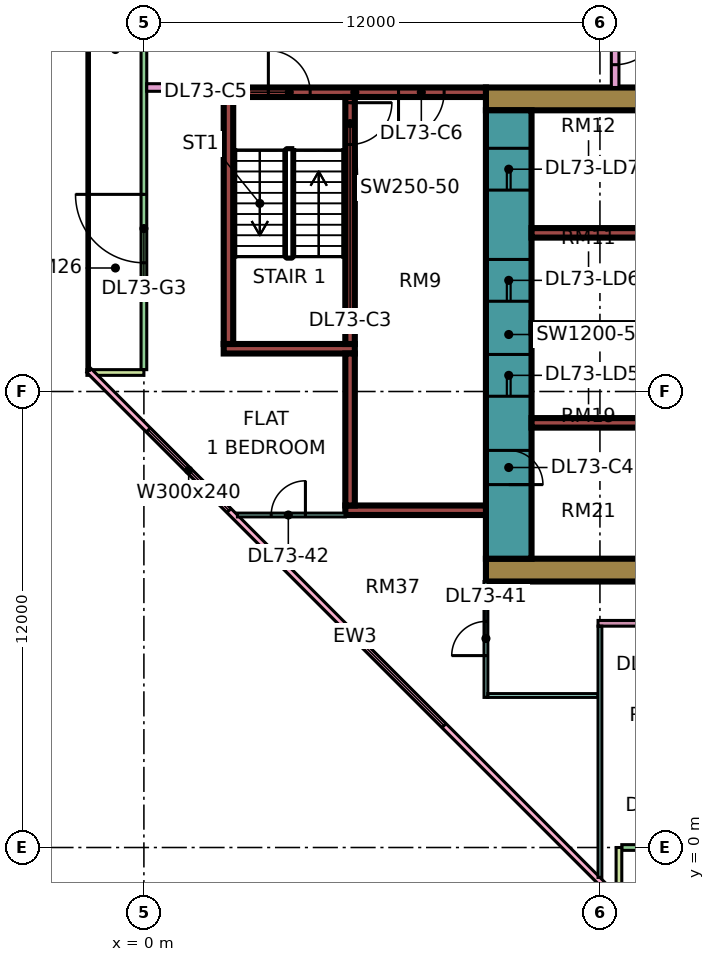
"""IFC4 building model, lengths in metres.
Left out: names, types, materials, properties, quantities, classifications, styles, units other than length and angle.
Written with IfcOpenShell. Run it as: python <this file> out.ifc"""

import sys

from ifc_helpers import new_model, si_unit, direction, frame, frame_2d, origin, place, context, subcontext, project, spatial, rectangle, extrude, element, fill, save


model = new_model("IFC4")
c1 = context("Model", 3, precision=1e-05, world=origin(), true_north=direction((0.0, 1.0)))
c2 = subcontext(c1, "Body", "Model", "MODEL_VIEW")
j1 = project(units=[si_unit("LENGTHUNIT", "METRE"), si_unit("PLANEANGLEUNIT", "RADIAN")], contexts=[c1])
p1 = place(None, origin())
s1 = spatial("IfcSite", under=j1, at=p1, CompositionType="ELEMENT")
p2 = place(p1, origin())
s2 = spatial("IfcBuilding", under=s1, at=p2, CompositionType="ELEMENT")
p3 = place(p2, frame((0.0, 0.0, 310.9)))
s3 = spatial("IfcBuildingStorey", under=s2, at=p3, CompositionType="ELEMENT", Elevation=310.9)
p4 = place(p3, frame((9.0, 7.3, 0.0), z_axis=(0.0, 0.0, 1.0), x_axis=(1.0, 0.0, 0.0)))
e1 = element("IfcWall", 1, at=p4, inside=s3, PredefinedType="SHEAR", context=c2, shape_type="SweptSolid", body=[
    extrude(rectangle(XDim=25.0, YDim=0.6, at=frame_2d((12.5, 0.0))), origin(), (0.0, 0.0, 1.0), 3.75),
])
p5 = place(p3, frame((9.0, 19.7, 0.0), z_axis=(0.0, 0.0, 1.0), x_axis=(1.0, 0.0, 0.0)))
e2 = element("IfcWall", 2, at=p5, inside=s3, PredefinedType="SHEAR", context=c2, shape_type="SweptSolid", body=[
    extrude(rectangle(XDim=25.0, YDim=0.6, at=frame_2d((12.5, 0.0))), origin(), (0.0, 0.0, 1.0), 3.75),
])
p6 = place(p5, frame((19.1, 0.0, 0.0)))
e3 = element("IfcOpeningElement", 3, at=p6, cuts=e2, PredefinedType="OPENING", context=c2, shape_type="SweptSolid", body=[
    extrude(rectangle(XDim=1.8, YDim=2.4, at=frame_2d((0.9, 1.2))), frame((0.0, 0.31, 0.0), z_axis=(0.0, -1.0, 0.0), x_axis=(1.0, 0.0, 0.0)), (0.0, 0.0, 1.0), 0.62),
])
p7 = place(p3, frame((9.6, 7.6, 0.0), z_axis=(0.0, 0.0, 1.0), x_axis=(0.0, 1.0, 0.0)))
e4 = element("IfcWall", 4, at=p7, inside=s3, PredefinedType="SHEAR", context=c2, shape_type="SweptSolid", body=[
    extrude(rectangle(XDim=11.8, YDim=1.2, at=frame_2d((5.9, 0.0))), origin(), (0.0, 0.0, 1.0), 3.75),
])
p8 = place(p7, frame((4.275, 0.0, 0.0)))
e5 = element("IfcOpeningElement", 5, at=p8, cuts=e4, PredefinedType="OPENING", context=c2, shape_type="SweptSolid", body=[
    extrude(rectangle(XDim=1.1, YDim=2.2, at=frame_2d((0.55, 1.1))), frame((0.0, 0.61, 0.0), z_axis=(0.0, -1.0, 0.0), x_axis=(1.0, 0.0, 0.0)), (0.0, 0.0, 1.0), 1.22),
])
p9 = place(p7, frame((6.775, 0.0, 0.0)))
e6 = element("IfcOpeningElement", 6, at=p9, cuts=e4, PredefinedType="OPENING", context=c2, shape_type="SweptSolid", body=[
    extrude(rectangle(XDim=1.1, YDim=2.2, at=frame_2d((0.55, 1.1))), frame((0.0, 0.61, 0.0), z_axis=(0.0, -1.0, 0.0), x_axis=(1.0, 0.0, 0.0)), (0.0, 0.0, 1.0), 1.22),
])
p10 = place(p7, frame((9.7, 0.0, 0.0)))
e7 = element("IfcOpeningElement", 7, at=p10, cuts=e4, PredefinedType="OPENING", context=c2, shape_type="SweptSolid", body=[
    extrude(rectangle(XDim=1.1, YDim=2.2, at=frame_2d((0.55, 1.1))), frame((0.0, 0.61, 0.0), z_axis=(0.0, -1.0, 0.0), x_axis=(1.0, 0.0, 0.0)), (0.0, 0.0, 1.0), 1.22),
])
p11 = place(p7, frame((1.95, 0.0, 0.0)))
e8 = element("IfcOpeningElement", 8, at=p11, cuts=e4, PredefinedType="OPENING", context=c2, shape_type="SweptSolid", body=[
    extrude(rectangle(XDim=0.9, YDim=2.1, at=frame_2d((0.45, 1.05))), frame((0.0, 0.61, 0.0), z_axis=(0.0, -1.0, 0.0), x_axis=(1.0, 0.0, 0.0)), (0.0, 0.0, 1.0), 1.22),
])
for number, where, z_axis, x_axis in (
    (9, (10.2, 11.175, 0.0), (0.0, 0.0, 1.0), (1.0, 0.0, 0.0)),
    (10, (10.2, 13.675, 0.0), (0.0, 0.0, 1.0), (1.0, 0.0, 0.0)),
    (11, (10.2, 16.175, 0.0), (0.0, 0.0, 1.0), (1.0, 0.0, 0.0)),
):
    element("IfcWall", number, at=place(p3, frame(where, z_axis=z_axis, x_axis=x_axis)), inside=s3, PredefinedType="SHEAR", context=c2, shape_type="SweptSolid", body=[
        extrude(rectangle(XDim=3.0, YDim=0.25, at=frame_2d((1.5, 0.0))), origin(), (0.0, 0.0, 1.0), 3.75),
    ])
p12 = place(p3, frame((2.1, 19.875, 0.0), z_axis=(0.0, 0.0, 1.0), x_axis=(1.0, 0.0, 0.0)))
e12 = element("IfcWall", 12, at=p12, inside=s3, PredefinedType="SHEAR", context=c2, shape_type="SweptSolid", body=[
    extrude(rectangle(XDim=6.9, YDim=0.25, at=frame_2d((3.45, 0.0))), origin(), (0.0, 0.0, 1.0), 3.75),
])
p13 = place(p12, frame((1.175, 0.0, 0.0)))
e13 = element("IfcOpeningElement", 13, at=p13, cuts=e12, PredefinedType="OPENING", context=c2, shape_type="SweptSolid", body=[
    extrude(rectangle(XDim=1.1, YDim=2.2, at=frame_2d((0.55, 1.1))), frame((0.0, 0.135, 0.0), z_axis=(0.0, -1.0, 0.0), x_axis=(1.0, 0.0, 0.0)), (0.0, 0.0, 1.0), 0.27),
])
p14 = place(p12, frame((4.6, 0.0, 0.0)))
e14 = element("IfcOpeningElement", 14, at=p14, cuts=e12, PredefinedType="OPENING", context=c2, shape_type="SweptSolid", body=[
    extrude(rectangle(XDim=1.2, YDim=2.2, at=frame_2d((0.6, 1.1))), frame((0.0, 0.135, 0.0), z_axis=(0.0, -1.0, 0.0), x_axis=(1.0, 0.0, 0.0)), (0.0, 0.0, 1.0), 0.27),
])
p15 = place(p3, frame((2.1, 13.125, 0.0), z_axis=(0.0, 0.0, 1.0), x_axis=(1.0, 0.0, 0.0)))
e15 = element("IfcWall", 15, at=p15, inside=s3, PredefinedType="SHEAR", context=c2, shape_type="SweptSolid", body=[
    extrude(rectangle(XDim=3.45, YDim=0.25, at=frame_2d((1.725, 0.0))), origin(), (0.0, 0.0, 1.0), 3.75),
])
p16 = place(p3, frame((2.225, 13.25, 0.0), z_axis=(0.0, 0.0, 1.0), x_axis=(0.0, 1.0, 0.0)))
e16 = element("IfcWall", 16, at=p16, inside=s3, PredefinedType="SHEAR", context=c2, shape_type="SweptSolid", body=[
    extrude(rectangle(XDim=6.5, YDim=0.25, at=frame_2d((3.25, 0.0))), origin(), (0.0, 0.0, 1.0), 3.75),
])
p17 = place(p3, frame((5.425, 13.25, 0.0), z_axis=(0.0, 0.0, 1.0), x_axis=(0.0, 1.0, 0.0)))
e17 = element("IfcWall", 17, at=p17, inside=s3, PredefinedType="SHEAR", context=c2, shape_type="SweptSolid", body=[
    extrude(rectangle(XDim=6.5, YDim=0.25, at=frame_2d((3.25, 0.0))), origin(), (0.0, 0.0, 1.0), 3.75),
])
p18 = place(p17, frame((5.25, 0.0, 0.0)))
e18 = element("IfcOpeningElement", 18, at=p18, cuts=e17, PredefinedType="OPENING", context=c2, shape_type="SweptSolid", body=[
    extrude(rectangle(XDim=1.1, YDim=2.2, at=frame_2d((0.55, 1.1))), frame((0.0, 0.135, 0.0), z_axis=(0.0, -1.0, 0.0), x_axis=(1.0, 0.0, 0.0)), (0.0, 0.0, 1.0), 0.27),
])
p19 = place(p3, frame((5.3, 8.875, 0.0), z_axis=(0.0, 0.0, 1.0), x_axis=(1.0, 0.0, 0.0)))
e19 = element("IfcWall", 19, at=p19, inside=s3, PredefinedType="SHEAR", context=c2, shape_type="SweptSolid", body=[
    extrude(rectangle(XDim=3.7, YDim=0.25, at=frame_2d((1.85, 0.0))), origin(), (0.0, 0.0, 1.0), 3.75),
])
p20 = place(p3, frame((5.425, 9.0, 0.0), z_axis=(0.0, 0.0, 1.0), x_axis=(0.0, 1.0, 0.0)))
e20 = element("IfcWall", 20, at=p20, inside=s3, PredefinedType="SHEAR", context=c2, shape_type="SweptSolid", body=[
    extrude(rectangle(XDim=4.0, YDim=0.25, at=frame_2d((2.0, 0.0))), origin(), (0.0, 0.0, 1.0), 3.75),
])
p21 = place(p3, frame((0.0, 23.925, 0.0), z_axis=(0.0, 0.0, 1.0), x_axis=(0.0, -1.0, 0.0)))
e21 = element("IfcWall", 21, at=p21, inside=s3, PredefinedType="SOLIDWALL", context=c2, shape_type="SweptSolid", body=[
    extrude(rectangle(XDim=11.35, YDim=0.15, at=frame_2d((5.675, 0.0))), origin(), (0.0, 0.0, 1.0), 3.35),
])
p22 = place(p21, frame((6.738, 0.0, 0.0)))
e22 = element("IfcOpeningElement", 22, at=p22, cuts=e21, PredefinedType="OPENING", context=c2, shape_type="SweptSolid", body=[
    extrude(rectangle(XDim=1.8, YDim=2.4, at=frame_2d((0.9, 1.2))), frame((0.0, 0.085, 0.0), z_axis=(0.0, -1.0, 0.0), x_axis=(1.0, 0.0, 0.0)), (0.0, 0.0, 1.0), 0.17),
])
p23 = place(p3, frame((-1.5, 12.5, 0.0), z_axis=(0.0, 0.0, 1.0), x_axis=(1.0, 0.0, 0.0)))
e23 = element("IfcWall", 23, at=p23, inside=s3, PredefinedType="SOLIDWALL", context=c2, shape_type="SweptSolid", body=[
    extrude(rectangle(XDim=1.5, YDim=0.15, at=frame_2d((0.75, 0.0))), origin(), (0.0, 0.0, 1.0), 3.35),
])
p24 = place(p3, frame((-1.447, 12.553, 0.0), z_axis=(0.0, 0.0, 1.0), x_axis=(0.707106781187, -0.707106781187, 0.0)))
e24 = element("IfcWall", 24, at=p24, inside=s3, PredefinedType="SOLIDWALL", context=c2, shape_type="SweptSolid", body=[
    extrude(rectangle(XDim=19.799, YDim=0.15, at=frame_2d((9.899, 0.0))), origin(), (0.0, 0.0, 1.0), 3.35),
])
p25 = place(p24, frame((2.212, 0.0, 0.45)))
e25 = element("IfcOpeningElement", 25, at=p25, cuts=e24, PredefinedType="OPENING", context=c2, shape_type="SweptSolid", body=[
    extrude(rectangle(XDim=3.0, YDim=2.4, at=frame_2d((1.5, 1.2))), frame((0.0, 0.085, 0.0), z_axis=(0.0, -1.0, 0.0), x_axis=(1.0, 0.0, 0.0)), (0.0, 0.0, 1.0), 0.17),
])
p26 = place(p24, frame((10.216, 0.0, 0.45)))
e26 = element("IfcOpeningElement", 26, at=p26, cuts=e24, PredefinedType="OPENING", context=c2, shape_type="SweptSolid", body=[
    extrude(rectangle(XDim=3.0, YDim=2.4, at=frame_2d((1.5, 1.2))), frame((0.0, 0.085, 0.0), z_axis=(0.0, -1.0, 0.0), x_axis=(1.0, 0.0, 0.0)), (0.0, 0.0, 1.0), 0.17),
])
p27 = place(p3, frame((12.575, 0.0, 0.0), z_axis=(0.0, 0.0, 1.0), x_axis=(1.0, 0.0, 0.0)))
e27 = element("IfcWall", 27, at=p27, inside=s3, PredefinedType="SOLIDWALL", context=c2, shape_type="SweptSolid", body=[
    extrude(rectangle(XDim=11.35, YDim=0.15, at=frame_2d((5.675, 0.0))), origin(), (0.0, 0.0, 1.0), 3.35),
])
p28 = place(p27, frame((0.613, 0.0, 0.0)))
e28 = element("IfcOpeningElement", 28, at=p28, cuts=e27, PredefinedType="OPENING", context=c2, shape_type="SweptSolid", body=[
    extrude(rectangle(XDim=1.2, YDim=2.4, at=frame_2d((0.6, 1.2))), frame((0.0, 0.085, 0.0), z_axis=(0.0, -1.0, 0.0), x_axis=(1.0, 0.0, 0.0)), (0.0, 0.0, 1.0), 0.17),
])
p29 = place(p27, frame((3.025, 0.0, 0.45)))
e29 = element("IfcOpeningElement", 29, at=p29, cuts=e27, PredefinedType="OPENING", context=c2, shape_type="SweptSolid", body=[
    extrude(rectangle(XDim=1.8, YDim=2.4, at=frame_2d((0.9, 1.2))), frame((0.0, 0.085, 0.0), z_axis=(0.0, -1.0, 0.0), x_axis=(1.0, 0.0, 0.0)), (0.0, 0.0, 1.0), 0.17),
])
p30 = place(p27, frame((6.675, 0.0, 0.45)))
e30 = element("IfcOpeningElement", 30, at=p30, cuts=e27, PredefinedType="OPENING", context=c2, shape_type="SweptSolid", body=[
    extrude(rectangle(XDim=3.0, YDim=2.4, at=frame_2d((1.5, 1.2))), frame((0.0, 0.085, 0.0), z_axis=(0.0, -1.0, 0.0), x_axis=(1.0, 0.0, 0.0)), (0.0, 0.0, 1.0), 0.17),
])
p31 = place(p3, frame((12.5, -1.5, 0.0), z_axis=(0.0, 0.0, 1.0), x_axis=(0.0, 1.0, 0.0)))
e31 = element("IfcWall", 31, at=p31, inside=s3, PredefinedType="SOLIDWALL", context=c2, shape_type="SweptSolid", body=[
    extrude(rectangle(XDim=1.5, YDim=0.15, at=frame_2d((0.75, 0.0))), origin(), (0.0, 0.0, 1.0), 3.35),
])
p32 = place(p3, frame((0.074, 20.0, 0.0), z_axis=(0.0, 0.0, 1.0), x_axis=(1.0, 0.0, 0.0)))
e32 = element("IfcWall", 32, at=p32, inside=s3, PredefinedType="PARTITIONING", context=c2, shape_type="SweptSolid", body=[
    extrude(rectangle(XDim=2.026, YDim=0.2, at=frame_2d((1.013, 0.0))), origin(), (0.0, 0.0, 1.0), 3.35),
])
p33 = place(p3, frame((2.461, 8.75, 0.0), z_axis=(0.0, 0.0, 1.0), x_axis=(1.0, 0.0, 0.0)))
e33 = element("IfcWall", 33, at=p33, inside=s3, PredefinedType="PARTITIONING", context=c2, shape_type="SweptSolid", body=[
    extrude(rectangle(XDim=2.839, YDim=0.1, at=frame_2d((1.419, 0.0))), origin(), (0.0, 0.0, 1.0), 3.35),
])
p34 = place(p33, frame((0.889, 0.0, 0.0)))
e34 = element("IfcOpeningElement", 34, at=p34, cuts=e33, PredefinedType="OPENING", context=c2, shape_type="SweptSolid", body=[
    extrude(rectangle(XDim=0.9, YDim=2.1, at=frame_2d((0.45, 1.05))), frame((0.0, 0.06, 0.0), z_axis=(0.0, -1.0, 0.0), x_axis=(1.0, 0.0, 0.0)), (0.0, 0.0, 1.0), 0.12),
])
p35 = place(p3, frame((9.0, 3.95, 0.0), z_axis=(0.0, 0.0, 1.0), x_axis=(0.0, 1.0, 0.0)))
e35 = element("IfcWall", 35, at=p35, inside=s3, PredefinedType="PARTITIONING", context=c2, shape_type="SweptSolid", body=[
    extrude(rectangle(XDim=3.05, YDim=0.1, at=frame_2d((1.525, 0.0))), origin(), (0.0, 0.0, 1.0), 3.35),
])
p36 = place(p35, frame((1.1, 0.0, 0.0)))
e36 = element("IfcOpeningElement", 36, at=p36, cuts=e35, PredefinedType="OPENING", context=c2, shape_type="SweptSolid", body=[
    extrude(rectangle(XDim=0.9, YDim=2.1, at=frame_2d((0.45, 1.05))), frame((0.0, 0.06, 0.0), z_axis=(0.0, -1.0, 0.0), x_axis=(1.0, 0.0, 0.0)), (0.0, 0.0, 1.0), 0.12),
])
p37 = place(p3, frame((9.05, 4.0, 0.0), z_axis=(0.0, 0.0, 1.0), x_axis=(1.0, 0.0, 0.0)))
e37 = element("IfcWall", 37, at=p37, inside=s3, PredefinedType="PARTITIONING", context=c2, shape_type="SweptSolid", body=[
    extrude(rectangle(XDim=2.9, YDim=0.1, at=frame_2d((1.45, 0.0))), origin(), (0.0, 0.0, 1.0), 3.35),
])
p38 = place(p3, frame((11.95, 5.9, 0.0), z_axis=(0.0, 0.0, 1.0), x_axis=(1.0, 0.0, 0.0)))
e38 = element("IfcWall", 38, at=p38, inside=s3, PredefinedType="PARTITIONING", context=c2, shape_type="SweptSolid", body=[
    extrude(rectangle(XDim=21.1, YDim=0.15, at=frame_2d((10.55, 0.0))), origin(), (0.0, 0.0, 1.0), 3.35),
])
p39 = place(p38, frame((1.1, 0.0, 0.0)))
e39 = element("IfcOpeningElement", 39, at=p39, cuts=e38, PredefinedType="OPENING", context=c2, shape_type="SweptSolid", body=[
    extrude(rectangle(XDim=0.9, YDim=2.1, at=frame_2d((0.45, 1.05))), frame((0.0, 0.085, 0.0), z_axis=(0.0, -1.0, 0.0), x_axis=(1.0, 0.0, 0.0)), (0.0, 0.0, 1.0), 0.17),
])
p40 = place(p38, frame((4.1, 0.0, 0.0)))
e40 = element("IfcOpeningElement", 40, at=p40, cuts=e38, PredefinedType="OPENING", context=c2, shape_type="SweptSolid", body=[
    extrude(rectangle(XDim=0.9, YDim=2.1, at=frame_2d((0.45, 1.05))), frame((0.0, 0.085, 0.0), z_axis=(0.0, -1.0, 0.0), x_axis=(1.0, 0.0, 0.0)), (0.0, 0.0, 1.0), 0.17),
])
p41 = place(p38, frame((10.1, 0.0, 0.0)))
e41 = element("IfcOpeningElement", 41, at=p41, cuts=e38, PredefinedType="OPENING", context=c2, shape_type="SweptSolid", body=[
    extrude(rectangle(XDim=0.9, YDim=2.1, at=frame_2d((0.45, 1.05))), frame((0.0, 0.085, 0.0), z_axis=(0.0, -1.0, 0.0), x_axis=(1.0, 0.0, 0.0)), (0.0, 0.0, 1.0), 0.17),
])
p42 = place(p38, frame((16.1, 0.0, 0.0)))
e42 = element("IfcOpeningElement", 42, at=p42, cuts=e38, PredefinedType="OPENING", context=c2, shape_type="SweptSolid", body=[
    extrude(rectangle(XDim=0.9, YDim=2.1, at=frame_2d((0.45, 1.05))), frame((0.0, 0.085, 0.0), z_axis=(0.0, -1.0, 0.0), x_axis=(1.0, 0.0, 0.0)), (0.0, 0.0, 1.0), 0.17),
])
p43 = place(p3, frame((12.0, -0.788, 0.0), z_axis=(0.0, 0.0, 1.0), x_axis=(0.0, 1.0, 0.0)))
e43 = element("IfcWall", 43, at=p43, inside=s3, PredefinedType="PARTITIONING", context=c2, shape_type="SweptSolid", body=[
    extrude(rectangle(XDim=6.613, YDim=0.1, at=frame_2d((3.306, 0.0))), origin(), (0.0, 0.0, 1.0), 3.35),
])
p44 = place(p3, frame((12.4, 20.0, 0.0), z_axis=(0.0, 0.0, 1.0), x_axis=(0.0, 1.0, 0.0)))
e44 = element("IfcWall", 44, at=p44, inside=s3, PredefinedType="PARTITIONING", context=c2, shape_type="SweptSolid", body=[
    extrude(rectangle(XDim=33.926, YDim=0.2, at=frame_2d((16.963, 0.0))), origin(), (0.0, 0.0, 1.0), 3.35),
])
p45 = place(p44, frame((31.8, 0.0, 0.0)))
e45 = element("IfcOpeningElement", 45, at=p45, cuts=e44, PredefinedType="OPENING", context=c2, shape_type="SweptSolid", body=[
    extrude(rectangle(XDim=1.0, YDim=2.1, at=frame_2d((0.5, 1.05))), frame((0.0, 0.11, 0.0), z_axis=(0.0, -1.0, 0.0), x_axis=(1.0, 0.0, 0.0)), (0.0, 0.0, 1.0), 0.22),
])
p46 = place(p44, frame((0.6, 0.0, 0.0)))
e46 = element("IfcOpeningElement", 46, at=p46, cuts=e44, PredefinedType="OPENING", context=c2, shape_type="SweptSolid", body=[
    extrude(rectangle(XDim=1.2, YDim=2.1, at=frame_2d((0.6, 1.05))), frame((0.0, 0.11, 0.0), z_axis=(0.0, -1.0, 0.0), x_axis=(1.0, 0.0, 0.0)), (0.0, 0.0, 1.0), 0.22),
])
p47 = place(p44, frame((4.5, 0.0, 0.0)))
e47 = element("IfcOpeningElement", 47, at=p47, cuts=e44, PredefinedType="OPENING", context=c2, shape_type="SweptSolid", body=[
    extrude(rectangle(XDim=1.0, YDim=2.1, at=frame_2d((0.5, 1.05))), frame((0.0, 0.11, 0.0), z_axis=(0.0, -1.0, 0.0), x_axis=(1.0, 0.0, 0.0)), (0.0, 0.0, 1.0), 0.22),
])
p48 = place(p22, frame((1.8, 0.0, 0.0), z_axis=(0.0, 0.0, 1.0), x_axis=(-1.0, 0.0, 0.0)))
e48 = element("IfcDoor", 48, at=p48, inside=s3, OperationType="DOUBLE_DOOR_SINGLE_SWING", PredefinedType="DOOR", context=c2, shape_type="SweptSolid", body=[
    extrude(rectangle(XDim=1.8, YDim=2.4, at=frame_2d((0.9, 1.2))), frame((0.0, 0.025, 0.0), z_axis=(0.0, -1.0, 0.0), x_axis=(1.0, 0.0, 0.0)), (0.0, 0.0, 1.0), 0.05),
])
fill(e22, e48)
p49 = place(p25, origin())
e49 = element("IfcWindow", 49, at=p49, inside=s3, PartitioningType="SINGLE_PANEL", PredefinedType="WINDOW", context=c2, shape_type="SweptSolid", body=[
    extrude(rectangle(XDim=3.0, YDim=2.4, at=frame_2d((1.5, 1.2))), frame((0.0, 0.03, 0.0), z_axis=(0.0, -1.0, 0.0), x_axis=(1.0, 0.0, 0.0)), (0.0, 0.0, 1.0), 0.06),
])
fill(e25, e49)
p50 = place(p26, origin())
e50 = element("IfcWindow", 50, at=p50, inside=s3, PartitioningType="SINGLE_PANEL", PredefinedType="WINDOW", context=c2, shape_type="SweptSolid", body=[
    extrude(rectangle(XDim=3.0, YDim=2.4, at=frame_2d((1.5, 1.2))), frame((0.0, 0.03, 0.0), z_axis=(0.0, -1.0, 0.0), x_axis=(1.0, 0.0, 0.0)), (0.0, 0.0, 1.0), 0.06),
])
fill(e26, e50)
p51 = place(p8, origin())
e51 = element("IfcDoor", 51, at=p51, inside=s3, OperationType="DOUBLE_DOOR_SLIDING", PredefinedType="DOOR", context=c2, shape_type="SweptSolid", body=[
    extrude(rectangle(XDim=1.1, YDim=2.2, at=frame_2d((0.55, 1.1))), frame((0.0, 0.025, 0.0), z_axis=(0.0, -1.0, 0.0), x_axis=(1.0, 0.0, 0.0)), (0.0, 0.0, 1.0), 0.05),
])
fill(e5, e51)
p52 = place(p9, origin())
e52 = element("IfcDoor", 52, at=p52, inside=s3, OperationType="DOUBLE_DOOR_SLIDING", PredefinedType="DOOR", context=c2, shape_type="SweptSolid", body=[
    extrude(rectangle(XDim=1.1, YDim=2.2, at=frame_2d((0.55, 1.1))), frame((0.0, 0.025, 0.0), z_axis=(0.0, -1.0, 0.0), x_axis=(1.0, 0.0, 0.0)), (0.0, 0.0, 1.0), 0.05),
])
fill(e6, e52)
p53 = place(p10, origin())
e53 = element("IfcDoor", 53, at=p53, inside=s3, OperationType="DOUBLE_DOOR_SLIDING", PredefinedType="DOOR", context=c2, shape_type="SweptSolid", body=[
    extrude(rectangle(XDim=1.1, YDim=2.2, at=frame_2d((0.55, 1.1))), frame((0.0, 0.025, 0.0), z_axis=(0.0, -1.0, 0.0), x_axis=(1.0, 0.0, 0.0)), (0.0, 0.0, 1.0), 0.05),
])
fill(e7, e53)
p54 = place(p18, origin())
e54 = element("IfcDoor", 54, at=p54, inside=s3, OperationType="SINGLE_SWING_RIGHT", PredefinedType="DOOR", context=c2, shape_type="SweptSolid", body=[
    extrude(rectangle(XDim=1.1, YDim=2.2, at=frame_2d((0.55, 1.1))), frame((0.0, 0.025, 0.0), z_axis=(0.0, -1.0, 0.0), x_axis=(1.0, 0.0, 0.0)), (0.0, 0.0, 1.0), 0.05),
])
fill(e18, e54)
p55 = place(p11, frame((0.9, 0.0, 0.0), z_axis=(0.0, 0.0, 1.0), x_axis=(-1.0, 0.0, 0.0)))
e55 = element("IfcDoor", 55, at=p55, inside=s3, OperationType="SINGLE_SWING_LEFT", PredefinedType="DOOR", context=c2, shape_type="SweptSolid", body=[
    extrude(rectangle(XDim=0.9, YDim=2.1, at=frame_2d((0.45, 1.05))), frame((0.0, 0.025, 0.0), z_axis=(0.0, -1.0, 0.0), x_axis=(1.0, 0.0, 0.0)), (0.0, 0.0, 1.0), 0.05),
])
fill(e8, e55)
p56 = place(p13, origin())
e56 = element("IfcDoor", 56, at=p56, inside=s3, OperationType="SINGLE_SWING_LEFT", PredefinedType="DOOR", context=c2, shape_type="SweptSolid", body=[
    extrude(rectangle(XDim=1.1, YDim=2.2, at=frame_2d((0.55, 1.1))), frame((0.0, 0.025, 0.0), z_axis=(0.0, -1.0, 0.0), x_axis=(1.0, 0.0, 0.0)), (0.0, 0.0, 1.0), 0.05),
])
fill(e13, e56)
p57 = place(p14, frame((1.2, 0.0, 0.0), z_axis=(0.0, 0.0, 1.0), x_axis=(-1.0, 0.0, 0.0)))
e57 = element("IfcDoor", 57, at=p57, inside=s3, OperationType="SINGLE_SWING_LEFT", PredefinedType="DOOR", context=c2, shape_type="SweptSolid", body=[
    extrude(rectangle(XDim=1.2, YDim=2.2, at=frame_2d((0.6, 1.1))), frame((0.0, 0.025, 0.0), z_axis=(0.0, -1.0, 0.0), x_axis=(1.0, 0.0, 0.0)), (0.0, 0.0, 1.0), 0.05),
])
fill(e14, e57)
p58 = place(p46, origin())
e58 = element("IfcDoor", 58, at=p58, inside=s3, OperationType="SINGLE_SWING_RIGHT", PredefinedType="DOOR", context=c2, shape_type="SweptSolid", body=[
    extrude(rectangle(XDim=1.2, YDim=2.1, at=frame_2d((0.6, 1.05))), frame((0.0, 0.025, 0.0), z_axis=(0.0, -1.0, 0.0), x_axis=(1.0, 0.0, 0.0)), (0.0, 0.0, 1.0), 0.05),
])
fill(e46, e58)
p59 = place(p36, origin())
e59 = element("IfcDoor", 59, at=p59, inside=s3, OperationType="SINGLE_SWING_LEFT", PredefinedType="DOOR", context=c2, shape_type="SweptSolid", body=[
    extrude(rectangle(XDim=0.9, YDim=2.1, at=frame_2d((0.45, 1.05))), frame((0.0, 0.025, 0.0), z_axis=(0.0, -1.0, 0.0), x_axis=(1.0, 0.0, 0.0)), (0.0, 0.0, 1.0), 0.05),
])
fill(e36, e59)
p60 = place(p34, frame((0.9, 0.0, 0.0), z_axis=(0.0, 0.0, 1.0), x_axis=(-1.0, 0.0, 0.0)))
e60 = element("IfcDoor", 60, at=p60, inside=s3, OperationType="SINGLE_SWING_RIGHT", PredefinedType="DOOR", context=c2, shape_type="SweptSolid", body=[
    extrude(rectangle(XDim=0.9, YDim=2.1, at=frame_2d((0.45, 1.05))), frame((0.0, 0.025, 0.0), z_axis=(0.0, -1.0, 0.0), x_axis=(1.0, 0.0, 0.0)), (0.0, 0.0, 1.0), 0.05),
])
fill(e34, e60)
save(model, sys.argv[1])
